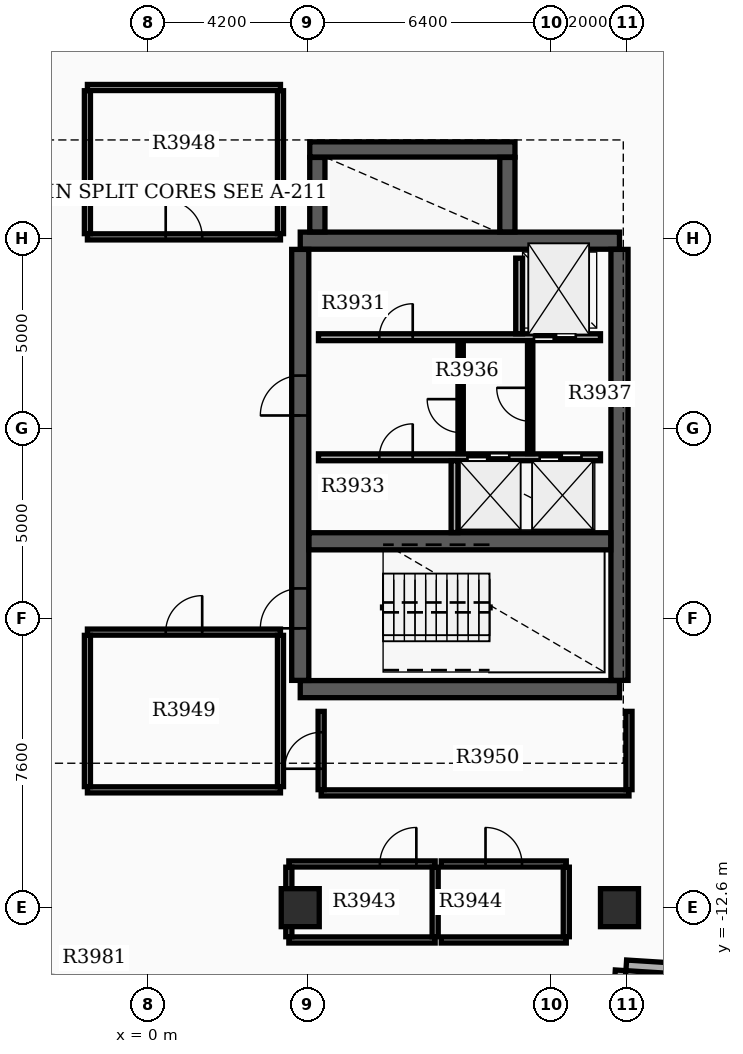
"""IFC4 building model, lengths in metres.
Left out: names, types, materials, properties, quantities, classifications, styles, units other than length and angle.
Written with IfcOpenShell. Run it as: python <this file> out.ifc"""

import sys

from ifc_helpers import new_model, si_unit, direction, frame, frame_2d, origin, origin_2d, place, context, subcontext, project, spatial, rectangle, extrude, element, fill, save


model = new_model("IFC4")
c1 = context("Model", 3, precision=1e-05, world=origin(), true_north=direction((0.0, 1.0)))
c2 = subcontext(c1, "Body", "Model", "MODEL_VIEW")
j1 = project(units=[si_unit("LENGTHUNIT", "METRE"), si_unit("PLANEANGLEUNIT", "RADIAN")], contexts=[c1])
p1 = place(None, origin())
s1 = spatial("IfcSite", under=j1, at=p1, CompositionType="ELEMENT")
p2 = place(p1, origin())
s2 = spatial("IfcBuilding", under=s1, at=p2, CompositionType="ELEMENT")
p3 = place(p2, frame((0.0, 0.0, 249.9)))
s3 = spatial("IfcBuildingStorey", under=s2, at=p3, CompositionType="ELEMENT", Elevation=249.9)
for number, where, z_axis, x_axis in (
    (1, (4.0, -6.85, 0.0), (0.0, 0.0, 1.0), (1.0, 0.0, 0.0)),
    (2, (4.0, 4.95, 0.0), (0.0, 0.0, 1.0), (1.0, 0.0, 0.0)),
):
    element("IfcWall", number, at=place(p3, frame(where, z_axis=z_axis, x_axis=x_axis)), inside=s3, PredefinedType="SHEAR", context=c2, shape_type="SweptSolid", body=[
        extrude(rectangle(XDim=8.4, YDim=0.45, at=frame_2d((4.2, 0.0))), origin(), (0.0, 0.0, 1.0), 3.7),
    ])
p4 = place(p3, frame((4.0, -6.62, 0.0), z_axis=(0.0, 0.0, 1.0), x_axis=(0.0, 1.0, 0.0)))
e3 = element("IfcWall", 3, at=p4, inside=s3, PredefinedType="SHEAR", context=c2, shape_type="SweptSolid", body=[
    extrude(rectangle(XDim=11.34, YDim=0.45, at=frame_2d((5.67, 0.0))), origin(), (0.0, 0.0, 1.0), 3.7),
])
p5 = place(p4, frame((1.37, 0.0, 0.0)))
e4 = element("IfcOpeningElement", 4, at=p5, cuts=e3, PredefinedType="OPENING", context=c2, shape_type="SweptSolid", body=[
    extrude(rectangle(XDim=1.05, YDim=2.15, at=frame_2d((0.525, 1.075))), frame((0.0, 0.235, 0.0), z_axis=(0.0, -1.0, 0.0), x_axis=(1.0, 0.0, 0.0)), (0.0, 0.0, 1.0), 0.47),
])
p6 = place(p4, frame((6.97, 0.0, 0.0)))
e5 = element("IfcOpeningElement", 5, at=p6, cuts=e3, PredefinedType="OPENING", context=c2, shape_type="SweptSolid", body=[
    extrude(rectangle(XDim=1.05, YDim=2.15, at=frame_2d((0.525, 1.075))), frame((0.0, 0.235, 0.0), z_axis=(0.0, -1.0, 0.0), x_axis=(1.0, 0.0, 0.0)), (0.0, 0.0, 1.0), 0.47),
])
p7 = place(p3, frame((12.4, -6.62, 0.0), z_axis=(0.0, 0.0, 1.0), x_axis=(0.0, 1.0, 0.0)))
e6 = element("IfcWall", 6, at=p7, inside=s3, PredefinedType="SHEAR", context=c2, shape_type="SweptSolid", body=[
    extrude(rectangle(XDim=11.34, YDim=0.45, at=frame_2d((5.67, 0.0))), origin(), (0.0, 0.0, 1.0), 3.7),
])
p8 = place(p3, frame((4.23, -2.96, 0.0), z_axis=(0.0, 0.0, 1.0), x_axis=(1.0, 0.0, 0.0)))
e7 = element("IfcWall", 7, at=p8, inside=s3, PredefinedType="SHEAR", context=c2, shape_type="SweptSolid", body=[
    extrude(rectangle(XDim=7.94, YDim=0.45, at=frame_2d((3.97, 0.0))), origin(), (0.0, 0.0, 1.0), 3.7),
])
p9 = place(p3, frame((4.45, 5.18, 0.0), z_axis=(0.0, 0.0, 1.0), x_axis=(0.0, 1.0, 0.0)))
e8 = element("IfcWall", 8, at=p9, inside=s3, PredefinedType="SHEAR", context=c2, shape_type="SweptSolid", body=[
    extrude(rectangle(XDim=1.96, YDim=0.4, at=frame_2d((0.98, 0.0))), origin(), (0.0, 0.0, 1.0), 3.7),
])
p10 = place(p3, frame((4.25, 7.35, 0.0), z_axis=(0.0, 0.0, 1.0), x_axis=(1.0, 0.0, 0.0)))
e9 = element("IfcWall", 9, at=p10, inside=s3, PredefinedType="SHEAR", context=c2, shape_type="SweptSolid", body=[
    extrude(rectangle(XDim=5.4, YDim=0.4, at=frame_2d((2.7, 0.0))), origin(), (0.0, 0.0, 1.0), 3.7),
])
p11 = place(p3, frame((9.45, 5.18, 0.0), z_axis=(0.0, 0.0, 1.0), x_axis=(0.0, 1.0, 0.0)))
e10 = element("IfcWall", 10, at=p11, inside=s3, PredefinedType="SHEAR", context=c2, shape_type="SweptSolid", body=[
    extrude(rectangle(XDim=1.96, YDim=0.4, at=frame_2d((0.98, 0.0))), origin(), (0.0, 0.0, 1.0), 3.7),
])
for number, where, z_axis, x_axis in (
    (11, (12.4, -12.6, 0.0), (0.0, 0.0, 1.0), (1.0, 0.0, 0.0)),
    (12, (4.0, -12.6, 0.0), (0.0, 0.0, 1.0), (1.0, 0.0, 0.0)),
):
    element("IfcColumn", number, at=place(p3, frame(where, z_axis=z_axis, x_axis=x_axis)), inside=s3, PredefinedType="COLUMN", context=c2, shape_type="SweptSolid", body=[
        extrude(rectangle(XDim=1.0, YDim=1.0, at=origin_2d()), origin(), (0.0, 0.0, 1.0), 3.9),
    ])
p12 = place(p3, frame((13.796, -14.194, 0.0), z_axis=(0.0, 0.0, 1.0), x_axis=(-0.998023660242, 0.06283926796, 0.0)))
e13 = element("IfcWall", 13, at=p12, inside=s3, PredefinedType="STANDARD", context=c2, shape_type="SweptSolid", body=[
    extrude(rectangle(XDim=1.22, YDim=0.28, at=frame_2d((0.61, 0.0))), origin(), (0.0, 0.0, 1.0), 3.18),
])
p13 = place(p3, frame((12.43, -14.249, 0.0), z_axis=(0.0, 0.0, 1.0), x_axis=(-0.062824119533, -0.998024613927, 0.0)))
e14 = element("IfcWall", 14, at=p13, inside=s3, PredefinedType="STANDARD", context=c2, shape_type="SweptSolid", body=[
    extrude(rectangle(XDim=1.5, YDim=0.28, at=frame_2d((0.75, 0.0))), origin(), (0.0, 0.0, 1.0), 3.18),
])
p14 = place(p3, frame((4.48, 2.41, 0.0), z_axis=(0.0, 0.0, 1.0), x_axis=(1.0, 0.0, 0.0)))
e15 = element("IfcWall", 15, at=p14, inside=s3, PredefinedType="SOLIDWALL", context=c2, shape_type="SweptSolid", body=[
    extrude(rectangle(XDim=7.42, YDim=0.18, at=frame_2d((3.71, 0.0))), origin(), (0.0, 0.0, 1.0), 3.17),
])
p15 = place(p14, frame((5.67, 0.0, 0.0)))
e16 = element("IfcOpeningElement", 16, at=p15, cuts=e15, PredefinedType="OPENING", context=c2, shape_type="SweptSolid", body=[
    extrude(rectangle(XDim=1.1, YDim=2.15, at=frame_2d((0.55, 1.075))), frame((0.0, 0.1, 0.0), z_axis=(0.0, -1.0, 0.0), x_axis=(1.0, 0.0, 0.0)), (0.0, 0.0, 1.0), 0.2),
])
p16 = place(p14, frame((1.6, 0.0, 0.0)))
e17 = element("IfcOpeningElement", 17, at=p16, cuts=e15, PredefinedType="OPENING", context=c2, shape_type="SweptSolid", body=[
    extrude(rectangle(XDim=0.88, YDim=2.1, at=frame_2d((0.44, 1.05))), frame((0.0, 0.1, 0.0), z_axis=(0.0, -1.0, 0.0), x_axis=(1.0, 0.0, 0.0)), (0.0, 0.0, 1.0), 0.2),
])
p17 = place(p3, frame((4.48, -0.75, 0.0), z_axis=(0.0, 0.0, 1.0), x_axis=(1.0, 0.0, 0.0)))
e18 = element("IfcWall", 18, at=p17, inside=s3, PredefinedType="SOLIDWALL", context=c2, shape_type="SweptSolid", body=[
    extrude(rectangle(XDim=7.42, YDim=0.18, at=frame_2d((3.71, 0.0))), origin(), (0.0, 0.0, 1.0), 3.17),
])
p18 = place(p17, frame((3.92, 0.0, 0.0)))
e19 = element("IfcOpeningElement", 19, at=p18, cuts=e18, PredefinedType="OPENING", context=c2, shape_type="SweptSolid", body=[
    extrude(rectangle(XDim=1.1, YDim=2.15, at=frame_2d((0.55, 1.075))), frame((0.0, 0.1, 0.0), z_axis=(0.0, -1.0, 0.0), x_axis=(1.0, 0.0, 0.0)), (0.0, 0.0, 1.0), 0.2),
])
p19 = place(p17, frame((5.82, 0.0, 0.0)))
e20 = element("IfcOpeningElement", 20, at=p19, cuts=e18, PredefinedType="OPENING", context=c2, shape_type="SweptSolid", body=[
    extrude(rectangle(XDim=1.1, YDim=2.15, at=frame_2d((0.55, 1.075))), frame((0.0, 0.1, 0.0), z_axis=(0.0, -1.0, 0.0), x_axis=(1.0, 0.0, 0.0)), (0.0, 0.0, 1.0), 0.2),
])
p20 = place(p17, frame((1.6, 0.0, 0.0)))
e21 = element("IfcOpeningElement", 21, at=p20, cuts=e18, PredefinedType="OPENING", context=c2, shape_type="SweptSolid", body=[
    extrude(rectangle(XDim=0.88, YDim=2.1, at=frame_2d((0.44, 1.05))), frame((0.0, 0.1, 0.0), z_axis=(0.0, -1.0, 0.0), x_axis=(1.0, 0.0, 0.0)), (0.0, 0.0, 1.0), 0.2),
])
p21 = place(p3, frame((9.76, 2.5, 0.0), z_axis=(0.0, 0.0, 1.0), x_axis=(0.0, 1.0, 0.0)))
e22 = element("IfcWall", 22, at=p21, inside=s3, PredefinedType="SOLIDWALL", context=c2, shape_type="SweptSolid", body=[
    extrude(rectangle(XDim=1.99, YDim=0.18, at=frame_2d((0.995, 0.0))), origin(), (0.0, 0.0, 1.0), 3.17),
])
p22 = place(p3, frame((8.06, -2.73, 0.0), z_axis=(0.0, 0.0, 1.0), x_axis=(0.0, 1.0, 0.0)))
e23 = element("IfcWall", 23, at=p22, inside=s3, PredefinedType="SOLIDWALL", context=c2, shape_type="SweptSolid", body=[
    extrude(rectangle(XDim=1.89, YDim=0.18, at=frame_2d((0.945, 0.0))), origin(), (0.0, 0.0, 1.0), 3.17),
])
p23 = place(p3, frame((8.22, -0.65, 0.0), z_axis=(0.0, 0.0, 1.0), x_axis=(0.0, 1.0, 0.0)))
e24 = element("IfcWall", 24, at=p23, inside=s3, PredefinedType="SOLIDWALL", context=c2, shape_type="SweptSolid", body=[
    extrude(rectangle(XDim=2.96, YDim=0.14, at=frame_2d((1.48, 0.0))), origin(), (0.0, 0.0, 1.0), 3.17),
])
p24 = place(p23, frame((0.55, 0.0, 0.0)))
e25 = element("IfcOpeningElement", 25, at=p24, cuts=e24, PredefinedType="OPENING", context=c2, shape_type="SweptSolid", body=[
    extrude(rectangle(XDim=0.88, YDim=2.1, at=frame_2d((0.44, 1.05))), frame((0.0, 0.08, 0.0), z_axis=(0.0, -1.0, 0.0), x_axis=(1.0, 0.0, 0.0)), (0.0, 0.0, 1.0), 0.16),
])
p25 = place(p3, frame((10.05, -0.652, 0.0), z_axis=(0.0, 0.0, 1.0), x_axis=(0.0, 1.0, 0.0)))
e26 = element("IfcWall", 26, at=p25, inside=s3, PredefinedType="PARTITIONING", context=c2, shape_type="SweptSolid", body=[
    extrude(rectangle(XDim=2.962, YDim=0.14, at=frame_2d((1.481, 0.0))), origin(), (0.0, 0.0, 1.0), 3.17),
])
p26 = place(p25, frame((0.85, 0.0, 0.0)))
e27 = element("IfcOpeningElement", 27, at=p26, cuts=e26, PredefinedType="OPENING", context=c2, shape_type="SweptSolid", body=[
    extrude(rectangle(XDim=0.88, YDim=2.1, at=frame_2d((0.44, 1.05))), frame((0.0, 0.08, 0.0), z_axis=(0.0, -1.0, 0.0), x_axis=(1.0, 0.0, 0.0)), (0.0, 0.0, 1.0), 0.16),
])
p27 = place(p3, frame((3.7, -13.45, 0.0), z_axis=(0.0, 0.0, 1.0), x_axis=(1.0, 0.0, 0.0)))
e28 = element("IfcWall", 28, at=p27, inside=s3, PredefinedType="PARTITIONING", context=c2, shape_type="SweptSolid", body=[
    extrude(rectangle(XDim=3.85, YDim=0.16, at=frame_2d((1.925, 0.0))), origin(), (0.0, 0.0, 1.0), 3.17),
])
p28 = place(p3, frame((3.7, -11.45, 0.0), z_axis=(0.0, 0.0, 1.0), x_axis=(1.0, 0.0, 0.0)))
e29 = element("IfcWall", 29, at=p28, inside=s3, PredefinedType="PARTITIONING", context=c2, shape_type="SweptSolid", body=[
    extrude(rectangle(XDim=3.85, YDim=0.16, at=frame_2d((1.925, 0.0))), origin(), (0.0, 0.0, 1.0), 3.17),
])
p29 = place(p28, frame((2.395, 0.0, 0.0)))
e30 = element("IfcOpeningElement", 30, at=p29, cuts=e29, PredefinedType="OPENING", context=c2, shape_type="SweptSolid", body=[
    extrude(rectangle(XDim=0.96, YDim=2.15, at=frame_2d((0.48, 1.075))), frame((0.0, 0.09, 0.0), z_axis=(0.0, -1.0, 0.0), x_axis=(1.0, 0.0, 0.0)), (0.0, 0.0, 1.0), 0.18),
])
for number, where, z_axis, x_axis in (
    (31, (3.7, -13.365, 0.0), (0.0, 0.0, 1.0), (0.0, 1.0, 0.0)),
    (32, (7.55, -13.365, 0.0), (0.0, 0.0, 1.0), (0.0, 1.0, 0.0)),
):
    element("IfcWall", number, at=place(p3, frame(where, z_axis=z_axis, x_axis=x_axis)), inside=s3, PredefinedType="PARTITIONING", context=c2, shape_type="SweptSolid", body=[
        extrude(rectangle(XDim=1.83, YDim=0.16, at=frame_2d((0.915, 0.0))), origin(), (0.0, 0.0, 1.0), 3.17),
    ])
p30 = place(p3, frame((7.71, -13.45, 0.0), z_axis=(0.0, 0.0, 1.0), x_axis=(1.0, 0.0, 0.0)))
e33 = element("IfcWall", 33, at=p30, inside=s3, PredefinedType="PARTITIONING", context=c2, shape_type="SweptSolid", body=[
    extrude(rectangle(XDim=3.29, YDim=0.16, at=frame_2d((1.645, 0.0))), origin(), (0.0, 0.0, 1.0), 3.17),
])
p31 = place(p3, frame((7.71, -11.45, 0.0), z_axis=(0.0, 0.0, 1.0), x_axis=(1.0, 0.0, 0.0)))
e34 = element("IfcWall", 34, at=p31, inside=s3, PredefinedType="PARTITIONING", context=c2, shape_type="SweptSolid", body=[
    extrude(rectangle(XDim=3.29, YDim=0.16, at=frame_2d((1.645, 0.0))), origin(), (0.0, 0.0, 1.0), 3.17),
])
p32 = place(p31, frame((1.165, 0.0, 0.0)))
e35 = element("IfcOpeningElement", 35, at=p32, cuts=e34, PredefinedType="OPENING", context=c2, shape_type="SweptSolid", body=[
    extrude(rectangle(XDim=0.96, YDim=2.15, at=frame_2d((0.48, 1.075))), frame((0.0, 0.09, 0.0), z_axis=(0.0, -1.0, 0.0), x_axis=(1.0, 0.0, 0.0)), (0.0, 0.0, 1.0), 0.18),
])
p33 = place(p3, frame((11.0, -13.365, 0.0), z_axis=(0.0, 0.0, 1.0), x_axis=(0.0, 1.0, 0.0)))
e36 = element("IfcWall", 36, at=p33, inside=s3, PredefinedType="PARTITIONING", context=c2, shape_type="SweptSolid", body=[
    extrude(rectangle(XDim=1.83, YDim=0.16, at=frame_2d((0.915, 0.0))), origin(), (0.0, 0.0, 1.0), 3.17),
])
p34 = place(p3, frame((-1.6, 5.05, 0.0), z_axis=(0.0, 0.0, 1.0), x_axis=(1.0, 0.0, 0.0)))
e37 = element("IfcWall", 37, at=p34, inside=s3, PredefinedType="PARTITIONING", context=c2, shape_type="SweptSolid", body=[
    extrude(rectangle(XDim=5.08, YDim=0.16, at=frame_2d((2.54, 0.0))), origin(), (0.0, 0.0, 1.0), 3.17),
])
p35 = place(p34, frame((2.06, 0.0, 0.0)))
e38 = element("IfcOpeningElement", 38, at=p35, cuts=e37, PredefinedType="OPENING", context=c2, shape_type="SweptSolid", body=[
    extrude(rectangle(XDim=0.96, YDim=2.15, at=frame_2d((0.48, 1.075))), frame((0.0, 0.09, 0.0), z_axis=(0.0, -1.0, 0.0), x_axis=(1.0, 0.0, 0.0)), (0.0, 0.0, 1.0), 0.18),
])
p36 = place(p3, frame((-1.6, 8.98, 0.0), z_axis=(0.0, 0.0, 1.0), x_axis=(1.0, 0.0, 0.0)))
e39 = element("IfcWall", 39, at=p36, inside=s3, PredefinedType="PARTITIONING", context=c2, shape_type="SweptSolid", body=[
    extrude(rectangle(XDim=5.08, YDim=0.16, at=frame_2d((2.54, 0.0))), origin(), (0.0, 0.0, 1.0), 3.17),
])
for number, where, z_axis, x_axis in (
    (40, (-1.6, 5.135, 0.0), (0.0, 0.0, 1.0), (0.0, 1.0, 0.0)),
    (41, (3.48, 5.135, 0.0), (0.0, 0.0, 1.0), (0.0, 1.0, 0.0)),
):
    element("IfcWall", number, at=place(p3, frame(where, z_axis=z_axis, x_axis=x_axis)), inside=s3, PredefinedType="PARTITIONING", context=c2, shape_type="SweptSolid", body=[
        extrude(rectangle(XDim=3.76, YDim=0.16, at=frame_2d((1.88, 0.0))), origin(), (0.0, 0.0, 1.0), 3.17),
    ])
p37 = place(p3, frame((-1.6, -9.5, 0.0), z_axis=(0.0, 0.0, 1.0), x_axis=(1.0, 0.0, 0.0)))
e42 = element("IfcWall", 42, at=p37, inside=s3, PredefinedType="PARTITIONING", context=c2, shape_type="SweptSolid", body=[
    extrude(rectangle(XDim=5.08, YDim=0.16, at=frame_2d((2.54, 0.0))), origin(), (0.0, 0.0, 1.0), 3.17),
])
p38 = place(p3, frame((-1.6, -5.35, 0.0), z_axis=(0.0, 0.0, 1.0), x_axis=(1.0, 0.0, 0.0)))
e43 = element("IfcWall", 43, at=p38, inside=s3, PredefinedType="PARTITIONING", context=c2, shape_type="SweptSolid", body=[
    extrude(rectangle(XDim=5.08, YDim=0.16, at=frame_2d((2.54, 0.0))), origin(), (0.0, 0.0, 1.0), 3.17),
])
p39 = place(p38, frame((2.06, 0.0, 0.0)))
e44 = element("IfcOpeningElement", 44, at=p39, cuts=e43, PredefinedType="OPENING", context=c2, shape_type="SweptSolid", body=[
    extrude(rectangle(XDim=0.96, YDim=2.15, at=frame_2d((0.48, 1.075))), frame((0.0, 0.09, 0.0), z_axis=(0.0, -1.0, 0.0), x_axis=(1.0, 0.0, 0.0)), (0.0, 0.0, 1.0), 0.18),
])
for number, where, z_axis, x_axis in (
    (45, (-1.6, -9.415, 0.0), (0.0, 0.0, 1.0), (0.0, 1.0, 0.0)),
    (46, (3.48, -9.415, 0.0), (0.0, 0.0, 1.0), (0.0, 1.0, 0.0)),
):
    element("IfcWall", number, at=place(p3, frame(where, z_axis=z_axis, x_axis=x_axis)), inside=s3, PredefinedType="PARTITIONING", context=c2, shape_type="SweptSolid", body=[
        extrude(rectangle(XDim=3.98, YDim=0.16, at=frame_2d((1.99, 0.0))), origin(), (0.0, 0.0, 1.0), 3.17),
    ])
p40 = place(p3, frame((4.55, -9.58, 0.0), z_axis=(0.0, 0.0, 1.0), x_axis=(1.0, 0.0, 0.0)))
e47 = element("IfcWall", 47, at=p40, inside=s3, PredefinedType="PARTITIONING", context=c2, shape_type="SweptSolid", body=[
    extrude(rectangle(XDim=8.1, YDim=0.16, at=frame_2d((4.05, 0.0))), origin(), (0.0, 0.0, 1.0), 3.17),
])
p41 = place(p3, frame((4.55, -9.495, 0.0), z_axis=(0.0, 0.0, 1.0), x_axis=(0.0, 1.0, 0.0)))
e48 = element("IfcWall", 48, at=p41, inside=s3, PredefinedType="PARTITIONING", context=c2, shape_type="SweptSolid", body=[
    extrude(rectangle(XDim=2.06, YDim=0.16, at=frame_2d((1.03, 0.0))), origin(), (0.0, 0.0, 1.0), 3.17),
])
p42 = place(p41, frame((0.55, 0.0, 0.0)))
e49 = element("IfcOpeningElement", 49, at=p42, cuts=e48, PredefinedType="OPENING", context=c2, shape_type="SweptSolid", body=[
    extrude(rectangle(XDim=0.96, YDim=2.15, at=frame_2d((0.48, 1.075))), frame((0.0, 0.09, 0.0), z_axis=(0.0, -1.0, 0.0), x_axis=(1.0, 0.0, 0.0)), (0.0, 0.0, 1.0), 0.18),
])
p43 = place(p3, frame((12.65, -9.495, 0.0), z_axis=(0.0, 0.0, 1.0), x_axis=(0.0, 1.0, 0.0)))
e50 = element("IfcWall", 50, at=p43, inside=s3, PredefinedType="PARTITIONING", context=c2, shape_type="SweptSolid", body=[
    extrude(rectangle(XDim=2.06, YDim=0.16, at=frame_2d((1.03, 0.0))), origin(), (0.0, 0.0, 1.0), 3.17),
])
p44 = place(p3, frame((-2.115, -14.516, 0.0), z_axis=(0.0, 0.0, 1.0), x_axis=(-0.998025986639, 0.062802308829, 0.0)))
e51 = element("IfcWall", 51, at=p44, inside=s3, PredefinedType="PARTITIONING", context=c2, shape_type="SweptSolid", body=[
    extrude(rectangle(XDim=5.52, YDim=0.16, at=frame_2d((2.76, 0.0))), origin(), (0.0, 0.0, 1.0), 3.17),
])
p45 = place(p5, origin())
e52 = element("IfcDoor", 52, at=p45, inside=s3, OperationType="SINGLE_SWING_LEFT", PredefinedType="DOOR", context=c2, shape_type="SweptSolid", body=[
    extrude(rectangle(XDim=1.05, YDim=2.15, at=frame_2d((0.525, 1.075))), frame((0.0, 0.025, 0.0), z_axis=(0.0, -1.0, 0.0), x_axis=(1.0, 0.0, 0.0)), (0.0, 0.0, 1.0), 0.05),
])
fill(e4, e52)
p46 = place(p6, origin())
e53 = element("IfcDoor", 53, at=p46, inside=s3, OperationType="SINGLE_SWING_LEFT", PredefinedType="DOOR", context=c2, shape_type="SweptSolid", body=[
    extrude(rectangle(XDim=1.05, YDim=2.15, at=frame_2d((0.525, 1.075))), frame((0.0, 0.025, 0.0), z_axis=(0.0, -1.0, 0.0), x_axis=(1.0, 0.0, 0.0)), (0.0, 0.0, 1.0), 0.05),
])
fill(e5, e53)
p47 = place(p15, origin())
e54 = element("IfcDoor", 54, at=p47, inside=s3, OperationType="DOUBLE_DOOR_SLIDING", PredefinedType="DOOR", context=c2, shape_type="SweptSolid", body=[
    extrude(rectangle(XDim=1.1, YDim=2.15, at=frame_2d((0.55, 1.075))), frame((0.0, 0.025, 0.0), z_axis=(0.0, -1.0, 0.0), x_axis=(1.0, 0.0, 0.0)), (0.0, 0.0, 1.0), 0.05),
])
fill(e16, e54)
p48 = place(p18, origin())
e55 = element("IfcDoor", 55, at=p48, inside=s3, OperationType="DOUBLE_DOOR_SLIDING", PredefinedType="DOOR", context=c2, shape_type="SweptSolid", body=[
    extrude(rectangle(XDim=1.1, YDim=2.15, at=frame_2d((0.55, 1.075))), frame((0.0, 0.025, 0.0), z_axis=(0.0, -1.0, 0.0), x_axis=(1.0, 0.0, 0.0)), (0.0, 0.0, 1.0), 0.05),
])
fill(e19, e55)
p49 = place(p19, origin())
e56 = element("IfcDoor", 56, at=p49, inside=s3, OperationType="DOUBLE_DOOR_SLIDING", PredefinedType="DOOR", context=c2, shape_type="SweptSolid", body=[
    extrude(rectangle(XDim=1.1, YDim=2.15, at=frame_2d((0.55, 1.075))), frame((0.0, 0.025, 0.0), z_axis=(0.0, -1.0, 0.0), x_axis=(1.0, 0.0, 0.0)), (0.0, 0.0, 1.0), 0.05),
])
fill(e20, e56)
p50 = place(p16, origin())
e57 = element("IfcDoor", 57, at=p50, inside=s3, OperationType="SINGLE_SWING_RIGHT", PredefinedType="DOOR", context=c2, shape_type="SweptSolid", body=[
    extrude(rectangle(XDim=0.88, YDim=2.1, at=frame_2d((0.44, 1.05))), frame((0.0, 0.025, 0.0), z_axis=(0.0, -1.0, 0.0), x_axis=(1.0, 0.0, 0.0)), (0.0, 0.0, 1.0), 0.05),
])
fill(e17, e57)
p51 = place(p20, origin())
e58 = element("IfcDoor", 58, at=p51, inside=s3, OperationType="SINGLE_SWING_RIGHT", PredefinedType="DOOR", context=c2, shape_type="SweptSolid", body=[
    extrude(rectangle(XDim=0.88, YDim=2.1, at=frame_2d((0.44, 1.05))), frame((0.0, 0.025, 0.0), z_axis=(0.0, -1.0, 0.0), x_axis=(1.0, 0.0, 0.0)), (0.0, 0.0, 1.0), 0.05),
])
fill(e21, e58)
p52 = place(p24, origin())
e59 = element("IfcDoor", 59, at=p52, inside=s3, OperationType="SINGLE_SWING_RIGHT", PredefinedType="DOOR", context=c2, shape_type="SweptSolid", body=[
    extrude(rectangle(XDim=0.88, YDim=2.1, at=frame_2d((0.44, 1.05))), frame((0.0, 0.025, 0.0), z_axis=(0.0, -1.0, 0.0), x_axis=(1.0, 0.0, 0.0)), (0.0, 0.0, 1.0), 0.05),
])
fill(e25, e59)
p53 = place(p26, origin())
e60 = element("IfcDoor", 60, at=p53, inside=s3, OperationType="SINGLE_SWING_RIGHT", PredefinedType="DOOR", context=c2, shape_type="SweptSolid", body=[
    extrude(rectangle(XDim=0.88, YDim=2.1, at=frame_2d((0.44, 1.05))), frame((0.0, 0.025, 0.0), z_axis=(0.0, -1.0, 0.0), x_axis=(1.0, 0.0, 0.0)), (0.0, 0.0, 1.0), 0.05),
])
fill(e27, e60)
p54 = place(p29, origin())
e61 = element("IfcDoor", 61, at=p54, inside=s3, OperationType="SINGLE_SWING_RIGHT", PredefinedType="DOOR", context=c2, shape_type="SweptSolid", body=[
    extrude(rectangle(XDim=0.96, YDim=2.15, at=frame_2d((0.48, 1.075))), frame((0.0, 0.025, 0.0), z_axis=(0.0, -1.0, 0.0), x_axis=(1.0, 0.0, 0.0)), (0.0, 0.0, 1.0), 0.05),
])
fill(e30, e61)
p55 = place(p32, origin())
e62 = element("IfcDoor", 62, at=p55, inside=s3, OperationType="SINGLE_SWING_LEFT", PredefinedType="DOOR", context=c2, shape_type="SweptSolid", body=[
    extrude(rectangle(XDim=0.96, YDim=2.15, at=frame_2d((0.48, 1.075))), frame((0.0, 0.025, 0.0), z_axis=(0.0, -1.0, 0.0), x_axis=(1.0, 0.0, 0.0)), (0.0, 0.0, 1.0), 0.05),
])
fill(e35, e62)
p56 = place(p35, origin())
e63 = element("IfcDoor", 63, at=p56, inside=s3, OperationType="SINGLE_SWING_LEFT", PredefinedType="DOOR", context=c2, shape_type="SweptSolid", body=[
    extrude(rectangle(XDim=0.96, YDim=2.15, at=frame_2d((0.48, 1.075))), frame((0.0, 0.025, 0.0), z_axis=(0.0, -1.0, 0.0), x_axis=(1.0, 0.0, 0.0)), (0.0, 0.0, 1.0), 0.05),
])
fill(e38, e63)
p57 = place(p39, origin())
e64 = element("IfcDoor", 64, at=p57, inside=s3, OperationType="SINGLE_SWING_RIGHT", PredefinedType="DOOR", context=c2, shape_type="SweptSolid", body=[
    extrude(rectangle(XDim=0.96, YDim=2.15, at=frame_2d((0.48, 1.075))), frame((0.0, 0.025, 0.0), z_axis=(0.0, -1.0, 0.0), x_axis=(1.0, 0.0, 0.0)), (0.0, 0.0, 1.0), 0.05),
])
fill(e44, e64)
p58 = place(p42, origin())
e65 = element("IfcDoor", 65, at=p58, inside=s3, OperationType="SINGLE_SWING_LEFT", PredefinedType="DOOR", context=c2, shape_type="SweptSolid", body=[
    extrude(rectangle(XDim=0.96, YDim=2.15, at=frame_2d((0.48, 1.075))), frame((0.0, 0.025, 0.0), z_axis=(0.0, -1.0, 0.0), x_axis=(1.0, 0.0, 0.0)), (0.0, 0.0, 1.0), 0.05),
])
fill(e49, e65)
save(model, sys.argv[1])
